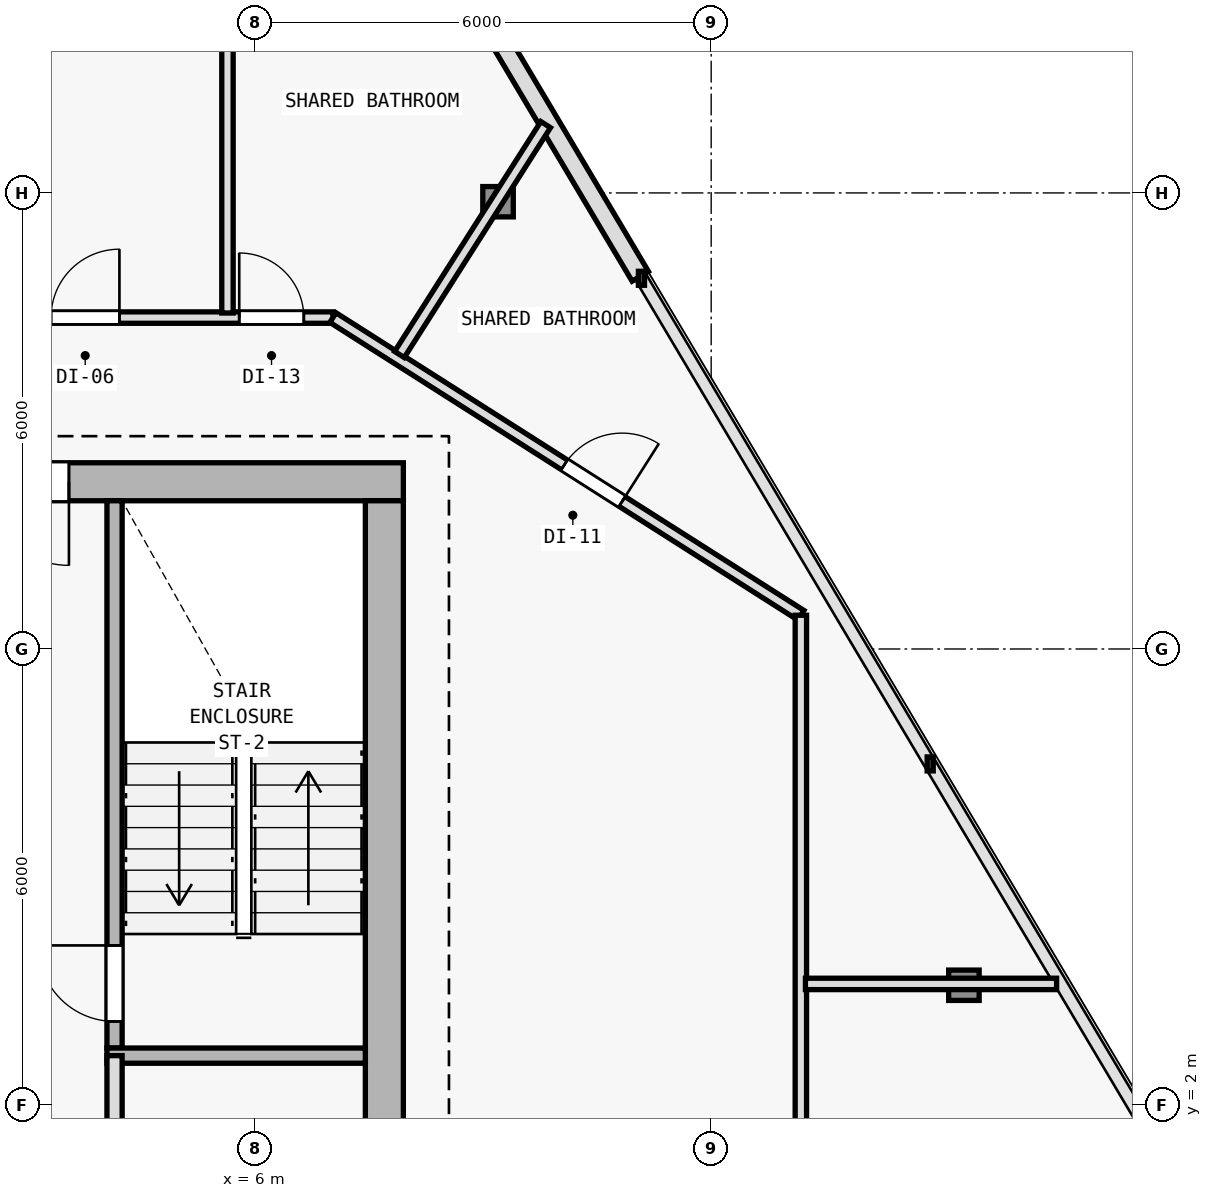
"""IFC4 building model, lengths in metres.
Left out: names, types, materials, properties, quantities, classifications, styles, units other than length and angle.
Written with IfcOpenShell. Run it as: python <this file> out.ifc"""

import sys

from ifc_helpers import new_model, si_unit, direction, frame, frame_2d, origin, origin_2d, place, context, subcontext, project, spatial, rectangle, i_section, extrude, element, fill, save


model = new_model("IFC4")
c1 = context("Model", 3, precision=1e-05, world=origin(), true_north=direction((0.0, 1.0)))
c2 = subcontext(c1, "Body", "Model", "MODEL_VIEW")
j1 = project(units=[si_unit("LENGTHUNIT", "METRE"), si_unit("PLANEANGLEUNIT", "RADIAN")], contexts=[c1])
p1 = place(None, origin())
s1 = spatial("IfcSite", under=j1, at=p1, CompositionType="ELEMENT")
p2 = place(p1, origin())
s2 = spatial("IfcBuilding", under=s1, at=p2, CompositionType="ELEMENT")
p3 = place(p2, frame((0.0, 0.0, 174.6)))
s3 = spatial("IfcBuildingStorey", under=s2, at=p3, CompositionType="ELEMENT", Elevation=174.6)
p4 = place(p3, frame((7.7, 10.2, 0.0), z_axis=(0.0, 0.0, 1.0), x_axis=(1.0, 0.0, 0.0)))
e1 = element("IfcColumn", 1, at=p4, inside=s3, PredefinedType="COLUMN", context=c2, shape_type="SweptSolid", body=[
    extrude(i_section(OverallWidth=0.404, OverallDepth=0.407, WebThickness=0.017, FlangeThickness=0.028, FilletRadius=0.015, at=origin_2d()), origin(), (0.0, 0.0, 1.0), 3.6),
])
p5 = place(p3, frame((15.325, 3.576, 0.005), z_axis=(-0.019449845701, 0.009792929304, 0.999762872904), x_axis=(-0.449710241045, -0.893174506521, 0.0)))
e2 = element("IfcColumn", 2, at=p5, inside=s3, PredefinedType="COLUMN", context=c2, shape_type="SweptSolid", body=[
    extrude(i_section(OverallWidth=0.401, OverallDepth=0.399, WebThickness=0.016, FlangeThickness=0.025, FilletRadius=0.015, at=origin_2d()), origin(), (0.0, 0.0, 1.0), 3.59),
])
p6 = place(p3, frame((9.196, 13.884, 0.005), z_axis=(-0.012107091976, -0.002584660085, 0.999923365992), x_axis=(0.208778603291, -0.977962931203, 0.0)))
e3 = element("IfcColumn", 3, at=p6, inside=s3, PredefinedType="COLUMN", context=c2, shape_type="SweptSolid", body=[
    extrude(i_section(OverallWidth=0.401, OverallDepth=0.399, WebThickness=0.016, FlangeThickness=0.025, FilletRadius=0.015, at=origin_2d()), origin(), (0.0, 0.0, 1.0), 3.589),
])
p7 = place(p3, frame((5.706, 21.919, 0.0), z_axis=(0.0, 0.0, 1.0), x_axis=(0.511079110892, -0.859533677298, 0.0)))
e4 = element("IfcWall", 4, at=p7, inside=s3, PredefinedType="SOLIDWALL", context=c2, shape_type="SweptSolid", body=[
    extrude(rectangle(XDim=10.489, YDim=0.25, at=frame_2d((5.245, 0.0))), origin(), (0.0, 0.0, 1.0), 3.35),
])
p8 = place(p7, frame((4.795, 0.0, 0.62)))
e5 = element("IfcOpeningElement", 5, at=p8, cuts=e4, PredefinedType="OPENING", context=c2, shape_type="SweptSolid", body=[
    extrude(rectangle(XDim=0.9, YDim=1.6, at=frame_2d((0.45, 0.8))), frame((0.0, 0.135, 0.0), z_axis=(0.0, -1.0, 0.0), x_axis=(1.0, 0.0, 0.0)), (0.0, 0.0, 1.0), 0.27),
])
p9 = place(p3, frame((7.95, 10.2, 0.0), z_axis=(0.0, 0.0, 1.0), x_axis=(-1.0, 0.0, 0.0)))
e6 = element("IfcWall", 6, at=p9, inside=s3, PredefinedType="SHEAR", context=c2, shape_type="SweptSolid", body=[
    extrude(rectangle(XDim=15.9, YDim=0.5, at=frame_2d((7.95, 0.0))), origin(), (0.0, 0.0, 1.0), 3.35),
])
p10 = place(p9, frame((4.4, 0.0, 0.0)))
e7 = element("IfcOpeningElement", 7, at=p10, cuts=e6, PredefinedType="OPENING", context=c2, shape_type="SweptSolid", body=[
    extrude(rectangle(XDim=1.1, YDim=2.15, at=frame_2d((0.55, 1.075))), frame((0.0, 0.26, 0.0), z_axis=(0.0, -1.0, 0.0), x_axis=(1.0, 0.0, 0.0)), (0.0, 0.0, 1.0), 0.52),
])
p11 = place(p3, frame((7.7, 9.95, 0.0), z_axis=(0.0, 0.0, 1.0), x_axis=(0.0, -1.0, 0.0)))
e8 = element("IfcWall", 8, at=p11, inside=s3, PredefinedType="SHEAR", context=c2, shape_type="SweptSolid", body=[
    extrude(rectangle(XDim=19.1, YDim=0.5, at=frame_2d((9.55, 0.0))), origin(), (0.0, 0.0, 1.0), 3.35),
])
p12 = place(p3, frame((4.15, 2.75, 0.0), z_axis=(0.0, 0.0, 1.0), x_axis=(0.0, 1.0, 0.0)))
e9 = element("IfcWall", 9, at=p12, inside=s3, PredefinedType="SOLIDWALL", context=c2, shape_type="SweptSolid", body=[
    extrude(rectangle(XDim=7.2, YDim=0.2, at=frame_2d((3.6, 0.0))), origin(), (0.0, 0.0, 1.0), 3.35),
])
p13 = place(p12, frame((0.35, 0.0, 0.0)))
e10 = element("IfcOpeningElement", 10, at=p13, cuts=e9, PredefinedType="OPENING", context=c2, shape_type="SweptSolid", body=[
    extrude(rectangle(XDim=1.0, YDim=2.15, at=frame_2d((0.5, 1.075))), frame((0.0, 0.11, 0.0), z_axis=(0.0, -1.0, 0.0), x_axis=(1.0, 0.0, 0.0)), (0.0, 0.0, 1.0), 0.22),
])
p14 = place(p3, frame((4.05, 2.65, 0.0), z_axis=(0.0, 0.0, 1.0), x_axis=(1.0, 0.0, 0.0)))
e11 = element("IfcWall", 11, at=p14, inside=s3, PredefinedType="SOLIDWALL", context=c2, shape_type="SweptSolid", body=[
    extrude(rectangle(XDim=3.4, YDim=0.2, at=frame_2d((1.7, 0.0))), origin(), (0.0, 0.0, 1.0), 3.35),
])
p15 = place(p3, frame((4.15, -6.05, 0.0), z_axis=(0.0, 0.0, 1.0), x_axis=(0.0, 1.0, 0.0)))
e12 = element("IfcWall", 12, at=p15, inside=s3, PredefinedType="SOLIDWALL", context=c2, shape_type="SweptSolid", body=[
    extrude(rectangle(XDim=8.7, YDim=0.2, at=frame_2d((4.35, 0.0))), origin(), (0.0, 0.0, 1.0), 3.35),
])
p16 = place(p15, frame((3.6, 0.0, 0.0)))
e13 = element("IfcOpeningElement", 13, at=p16, cuts=e12, PredefinedType="OPENING", context=c2, shape_type="SweptSolid", body=[
    extrude(rectangle(XDim=0.95, YDim=2.1, at=frame_2d((0.475, 1.05))), frame((0.0, 0.11, 0.0), z_axis=(0.0, -1.0, 0.0), x_axis=(1.0, 0.0, 0.0)), (0.0, 0.0, 1.0), 0.22),
])
p17 = place(p3, frame((-7.041, 12.36, 0.0), z_axis=(0.0, 0.0, 1.0), x_axis=(1.0, 0.0, 0.0)))
e14 = element("IfcWall", 14, at=p17, inside=s3, PredefinedType="PARTITIONING", context=c2, shape_type="SweptSolid", body=[
    extrude(rectangle(XDim=14.064, YDim=0.15, at=frame_2d((7.032, 0.0))), origin(), (0.0, 0.0, 1.0), 3.005),
])
p18 = place(p17, frame((12.832, 0.0, 0.0)))
e15 = element("IfcOpeningElement", 15, at=p18, cuts=e14, PredefinedType="OPENING", context=c2, shape_type="SweptSolid", body=[
    extrude(rectangle(XDim=0.85, YDim=2.1, at=frame_2d((0.425, 1.05))), frame((0.0, 0.085, 0.0), z_axis=(0.0, -1.0, 0.0), x_axis=(1.0, 0.0, 0.0)), (0.0, 0.0, 1.0), 0.17),
])
p19 = place(p17, frame((10.355, 0.0, 0.0)))
e16 = element("IfcOpeningElement", 16, at=p19, cuts=e14, PredefinedType="OPENING", context=c2, shape_type="SweptSolid", body=[
    extrude(rectangle(XDim=0.9, YDim=2.1, at=frame_2d((0.45, 1.05))), frame((0.0, 0.085, 0.0), z_axis=(0.0, -1.0, 0.0), x_axis=(1.0, 0.0, 0.0)), (0.0, 0.0, 1.0), 0.17),
])
p20 = place(p17, frame((4.183, 0.0, 0.0)))
e17 = element("IfcOpeningElement", 17, at=p20, cuts=e14, PredefinedType="OPENING", context=c2, shape_type="SweptSolid", body=[
    extrude(rectangle(XDim=0.9, YDim=2.1, at=frame_2d((0.45, 1.05))), frame((0.0, 0.085, 0.0), z_axis=(0.0, -1.0, 0.0), x_axis=(1.0, 0.0, 0.0)), (0.0, 0.0, 1.0), 0.17),
])
p21 = place(p3, frame((7.023, 12.36, 0.0), z_axis=(0.0, 0.0, 1.0), x_axis=(0.84376480085, -0.536713108511, 0.0)))
e18 = element("IfcWall", 18, at=p21, inside=s3, PredefinedType="PARTITIONING", context=c2, shape_type="SweptSolid", body=[
    extrude(rectangle(XDim=7.297, YDim=0.15, at=frame_2d((3.648, 0.0))), origin(), (0.0, 0.0, 1.0), 2.935),
])
p22 = place(p21, frame((3.609, 0.0, 0.0)))
e19 = element("IfcOpeningElement", 19, at=p22, cuts=e18, PredefinedType="OPENING", context=c2, shape_type="SweptSolid", body=[
    extrude(rectangle(XDim=0.9, YDim=2.1, at=frame_2d((0.45, 1.05))), frame((0.0, 0.085, 0.0), z_axis=(0.0, -1.0, 0.0), x_axis=(1.0, 0.0, 0.0)), (0.0, 0.0, 1.0), 0.17),
])
p23 = place(p3, frame((13.18, 8.444, 0.0), z_axis=(0.0, 0.0, 1.0), x_axis=(0.0, -1.0, 0.0)))
e20 = element("IfcWall", 20, at=p23, inside=s3, PredefinedType="PARTITIONING", context=c2, shape_type="SweptSolid", body=[
    extrude(rectangle(XDim=20.004, YDim=0.15, at=frame_2d((10.002, 0.0))), origin(), (0.0, 0.0, 1.0), 2.825),
])
p24 = place(p23, frame((11.888, 0.0, 0.0)))
e21 = element("IfcOpeningElement", 21, at=p24, cuts=e20, PredefinedType="OPENING", context=c2, shape_type="SweptSolid", body=[
    extrude(rectangle(XDim=0.9, YDim=2.1, at=frame_2d((0.45, 1.05))), frame((0.0, 0.085, 0.0), z_axis=(0.0, -1.0, 0.0), x_axis=(1.0, 0.0, 0.0)), (0.0, 0.0, 1.0), 0.17),
])
p25 = place(p3, frame((13.24, 3.594, 0.0), z_axis=(0.0, 0.0, 1.0), x_axis=(1.0, 0.0, 0.0)))
e22 = element("IfcWall", 22, at=p25, inside=s3, PredefinedType="PARTITIONING", context=c2, shape_type="SweptSolid", body=[
    extrude(rectangle(XDim=3.305, YDim=0.15, at=frame_2d((1.652, 0.0))), origin(), (0.0, 0.0, 1.0), 2.935),
])
p26 = place(p3, frame((7.899, 11.874, 0.0), z_axis=(0.0, 0.0, 1.0), x_axis=(0.53666833004, 0.843793282464, 0.0)))
e23 = element("IfcWall", 23, at=p26, inside=s3, PredefinedType="PARTITIONING", context=c2, shape_type="SweptSolid", body=[
    extrude(rectangle(XDim=3.584, YDim=0.15, at=frame_2d((1.792, 0.0))), origin(), (0.0, 0.0, 1.0), 2.935),
])
p27 = place(p3, frame((5.636, 12.42, 0.0), z_axis=(0.0, 0.0, 1.0), x_axis=(0.0, 1.0, 0.0)))
e24 = element("IfcWall", 24, at=p27, inside=s3, PredefinedType="PARTITIONING", context=c2, shape_type="SweptSolid", body=[
    extrude(rectangle(XDim=9.517, YDim=0.15, at=frame_2d((4.758, 0.0))), origin(), (0.0, 0.0, 1.0), 2.935),
])
p28 = place(p10, origin())
e25 = element("IfcDoor", 25, at=p28, inside=s3, OperationType="SINGLE_SWING_LEFT", PredefinedType="DOOR", context=c2, shape_type="SweptSolid", body=[
    extrude(rectangle(XDim=1.1, YDim=2.15, at=frame_2d((0.55, 1.075))), frame((0.0, 0.025, 0.0), z_axis=(0.0, -1.0, 0.0), x_axis=(1.0, 0.0, 0.0)), (0.0, 0.0, 1.0), 0.05),
])
fill(e7, e25)
p29 = place(p13, origin())
e26 = element("IfcDoor", 26, at=p29, inside=s3, OperationType="SINGLE_SWING_RIGHT", PredefinedType="DOOR", context=c2, shape_type="SweptSolid", body=[
    extrude(rectangle(XDim=1.0, YDim=2.15, at=frame_2d((0.5, 1.075))), frame((0.0, 0.025, 0.0), z_axis=(0.0, -1.0, 0.0), x_axis=(1.0, 0.0, 0.0)), (0.0, 0.0, 1.0), 0.05),
])
fill(e10, e26)
p30 = place(p22, origin())
e27 = element("IfcDoor", 27, at=p30, inside=s3, OperationType="SINGLE_SWING_RIGHT", PredefinedType="DOOR", context=c2, shape_type="SweptSolid", body=[
    extrude(rectangle(XDim=0.9, YDim=2.1, at=frame_2d((0.45, 1.05))), frame((0.0, 0.025, 0.0), z_axis=(0.0, -1.0, 0.0), x_axis=(1.0, 0.0, 0.0)), (0.0, 0.0, 1.0), 0.05),
])
fill(e19, e27)
p31 = place(p18, origin())
e28 = element("IfcDoor", 28, at=p31, inside=s3, OperationType="SINGLE_SWING_LEFT", PredefinedType="DOOR", context=c2, shape_type="SweptSolid", body=[
    extrude(rectangle(XDim=0.85, YDim=2.1, at=frame_2d((0.425, 1.05))), frame((0.0, 0.025, 0.0), z_axis=(0.0, -1.0, 0.0), x_axis=(1.0, 0.0, 0.0)), (0.0, 0.0, 1.0), 0.05),
])
fill(e15, e28)
p32 = place(p19, origin())
e29 = element("IfcDoor", 29, at=p32, inside=s3, OperationType="SINGLE_SWING_RIGHT", PredefinedType="DOOR", context=c2, shape_type="SweptSolid", body=[
    extrude(rectangle(XDim=0.9, YDim=2.1, at=frame_2d((0.45, 1.05))), frame((0.0, 0.025, 0.0), z_axis=(0.0, -1.0, 0.0), x_axis=(1.0, 0.0, 0.0)), (0.0, 0.0, 1.0), 0.05),
])
fill(e16, e29)
save(model, sys.argv[1])
